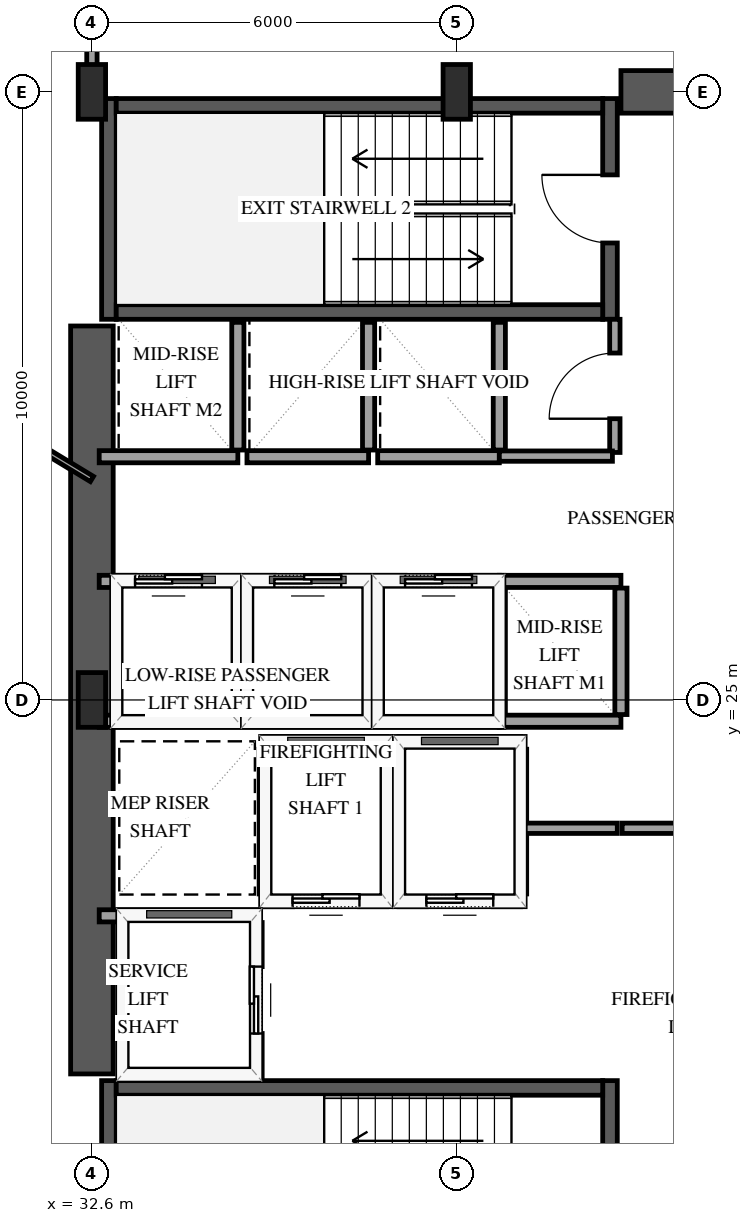
"""IFC4 building model, lengths in metres.
Left out: names, types, materials, properties, quantities, classifications, styles, units other than length and angle.
Written with IfcOpenShell. Run it as: python <this file> out.ifc"""

import sys

from ifc_helpers import new_model, si_unit, direction, frame, frame_2d, origin, origin_2d, place, context, subcontext, project, spatial, rectangle, extrude, element, fill, save


model = new_model("IFC4")
c1 = context("Model", 3, precision=1e-05, world=origin(), true_north=direction((0.0, 1.0)))
c2 = subcontext(c1, "Body", "Model", "MODEL_VIEW")
j1 = project(units=[si_unit("LENGTHUNIT", "METRE"), si_unit("PLANEANGLEUNIT", "RADIAN")], contexts=[c1])
p1 = place(None, origin())
s1 = spatial("IfcSite", under=j1, at=p1, CompositionType="ELEMENT")
p2 = place(p1, origin())
s2 = spatial("IfcBuilding", under=s1, at=p2, CompositionType="ELEMENT")
p3 = place(p2, frame((0.0, 0.0, 38.6)))
s3 = spatial("IfcBuildingStorey", under=s2, at=p3, CompositionType="ELEMENT", Elevation=38.6)
p4 = place(p3, frame((32.88, 15.11, 0.0), z_axis=(0.0, 0.0, 1.0), x_axis=(0.0, 1.0, 0.0)))
e1 = element("IfcWall", 1, at=p4, inside=s3, PredefinedType="SHEAR", context=c2, shape_type="SweptSolid", body=[
    extrude(rectangle(XDim=3.63, YDim=0.24, at=frame_2d((1.815, 0.0))), origin(), (0.0, 0.0, 1.0), 4.0),
])
p5 = place(p3, frame((41.12, 15.11, 0.0), z_axis=(0.0, 0.0, 1.0), x_axis=(0.0, 1.0, 0.0)))
e2 = element("IfcWall", 2, at=p5, inside=s3, PredefinedType="SHEAR", context=c2, shape_type="SweptSolid", body=[
    extrude(rectangle(XDim=3.63, YDim=0.24, at=frame_2d((1.815, 0.0))), origin(), (0.0, 0.0, 1.0), 4.0),
])
p6 = place(p5, frame((1.255, 0.0, 0.0)))
e3 = element("IfcOpeningElement", 3, at=p6, cuts=e2, PredefinedType="OPENING", context=c2, shape_type="SweptSolid", body=[
    extrude(rectangle(XDim=1.12, YDim=2.15, at=frame_2d((0.56, 1.075))), frame((0.0, 0.13, 0.0), z_axis=(0.0, -1.0, 0.0), x_axis=(1.0, 0.0, 0.0)), (0.0, 0.0, 1.0), 0.26),
])
p7 = place(p3, frame((33.0, 18.62, 0.0), z_axis=(0.0, 0.0, 1.0), x_axis=(1.0, 0.0, 0.0)))
e4 = element("IfcWall", 4, at=p7, inside=s3, PredefinedType="SHEAR", context=c2, shape_type="SweptSolid", body=[
    extrude(rectangle(XDim=8.0, YDim=0.24, at=frame_2d((4.0, 0.0))), origin(), (0.0, 0.0, 1.0), 4.0),
])
p8 = place(p3, frame((32.88, 31.26, 0.0), z_axis=(0.0, 0.0, 1.0), x_axis=(0.0, 1.0, 0.0)))
e5 = element("IfcWall", 5, at=p8, inside=s3, PredefinedType="SHEAR", context=c2, shape_type="SweptSolid", body=[
    extrude(rectangle(XDim=3.63, YDim=0.24, at=frame_2d((1.815, 0.0))), origin(), (0.0, 0.0, 1.0), 4.0),
])
p9 = place(p3, frame((41.12, 31.26, 0.0), z_axis=(0.0, 0.0, 1.0), x_axis=(0.0, 1.0, 0.0)))
e6 = element("IfcWall", 6, at=p9, inside=s3, PredefinedType="SHEAR", context=c2, shape_type="SweptSolid", body=[
    extrude(rectangle(XDim=3.63, YDim=0.24, at=frame_2d((1.815, 0.0))), origin(), (0.0, 0.0, 1.0), 4.0),
])
p10 = place(p9, frame((1.255, 0.0, 0.0)))
e7 = element("IfcOpeningElement", 7, at=p10, cuts=e6, PredefinedType="OPENING", context=c2, shape_type="SweptSolid", body=[
    extrude(rectangle(XDim=1.12, YDim=2.15, at=frame_2d((0.56, 1.075))), frame((0.0, 0.13, 0.0), z_axis=(0.0, -1.0, 0.0), x_axis=(1.0, 0.0, 0.0)), (0.0, 0.0, 1.0), 0.26),
])
for number, where, z_axis, x_axis in (
    (8, (33.0, 31.38, 0.0), (0.0, 0.0, 1.0), (1.0, 0.0, 0.0)),
    (9, (33.0, 34.77, 0.0), (0.0, 0.0, 1.0), (1.0, 0.0, 0.0)),
):
    element("IfcWall", number, at=place(p3, frame(where, z_axis=z_axis, x_axis=x_axis)), inside=s3, PredefinedType="SHEAR", context=c2, shape_type="SweptSolid", body=[
        extrude(rectangle(XDim=8.0, YDim=0.24, at=frame_2d((4.0, 0.0))), origin(), (0.0, 0.0, 1.0), 4.0),
    ])
p11 = place(p3, frame((32.6, 18.85, 0.0), z_axis=(0.0, 0.0, 1.0), x_axis=(0.0, 1.0, 0.0)))
e10 = element("IfcWall", 10, at=p11, inside=s3, PredefinedType="SHEAR", context=c2, shape_type="SweptSolid", body=[
    extrude(rectangle(XDim=12.3, YDim=0.7, at=frame_2d((6.15, 0.0))), origin(), (0.0, 0.0, 1.0), 4.0),
])
p12 = place(p3, frame((41.3, 35.0, 0.0), z_axis=(0.0, 0.0, 1.0), x_axis=(1.0, 0.0, 0.0)))
e11 = element("IfcWall", 11, at=p12, inside=s3, PredefinedType="SHEAR", context=c2, shape_type="SweptSolid", body=[
    extrude(rectangle(XDim=2.85, YDim=0.7, at=frame_2d((1.425, 0.0))), origin(), (0.0, 0.0, 1.0), 4.0),
])
for number, where, z_axis, x_axis in (
    (12, (32.6, 25.0, 0.0), (0.0, 0.0, 1.0), (1.0, 0.0, 0.0)),
    (13, (32.6, 35.0, 0.0), (0.0, 0.0, 1.0), (1.0, 0.0, 0.0)),
    (14, (38.6, 35.0, 0.0), (0.0, 0.0, 1.0), (1.0, 0.0, 0.0)),
):
    element("IfcColumn", number, at=place(p3, frame(where, z_axis=z_axis, x_axis=x_axis)), inside=s3, PredefinedType="PILASTER", context=c2, shape_type="SweptSolid", body=[
        extrude(rectangle(XDim=0.45, YDim=0.9, at=origin_2d()), origin(), (0.0, 0.0, 1.0), 4.0),
    ])
p13 = place(p3, frame((35.45, 21.7, 0.0), z_axis=(0.0, 0.0, 1.0), x_axis=(1.0, 0.0, 0.0)))
e15 = element("IfcWall", 15, at=p13, inside=s3, PredefinedType="SOLIDWALL", context=c2, shape_type="SweptSolid", body=[
    extrude(rectangle(XDim=2.0, YDim=0.2, at=frame_2d((1.0, 0.0))), origin(), (0.0, 0.0, 1.0), 3.7),
])
p14 = place(p13, frame((0.45, 0.0, 0.0)))
e16 = element("IfcOpeningElement", 16, at=p14, cuts=e15, PredefinedType="OPENING", context=c2, shape_type="SweptSolid", body=[
    extrude(rectangle(XDim=1.1, YDim=2.15, at=frame_2d((0.55, 1.075))), frame((0.0, 0.11, 0.0), z_axis=(0.0, -1.0, 0.0), x_axis=(1.0, 0.0, 0.0)), (0.0, 0.0, 1.0), 0.22),
])
p15 = place(p3, frame((35.45, 24.3, 0.0), z_axis=(0.0, 0.0, 1.0), x_axis=(1.0, 0.0, 0.0)))
e17 = element("IfcWall", 17, at=p15, inside=s3, PredefinedType="SOLIDWALL", context=c2, shape_type="SweptSolid", body=[
    extrude(rectangle(XDim=2.0, YDim=0.2, at=frame_2d((1.0, 0.0))), origin(), (0.0, 0.0, 1.0), 3.7),
])
for number, where, z_axis, x_axis in (
    (18, (35.45, 21.81, 0.0), (0.0, 0.0, 1.0), (0.0, 1.0, 0.0)),
    (19, (37.45, 21.81, 0.0), (0.0, 0.0, 1.0), (0.0, 1.0, 0.0)),
):
    element("IfcWall", number, at=place(p3, frame(where, z_axis=z_axis, x_axis=x_axis)), inside=s3, PredefinedType="SOLIDWALL", context=c2, shape_type="SweptSolid", body=[
        extrude(rectangle(XDim=2.38, YDim=0.2, at=frame_2d((1.19, 0.0))), origin(), (0.0, 0.0, 1.0), 3.7),
    ])
p16 = place(p3, frame((37.65, 21.7, 0.0), z_axis=(0.0, 0.0, 1.0), x_axis=(1.0, 0.0, 0.0)))
e20 = element("IfcWall", 20, at=p16, inside=s3, PredefinedType="SOLIDWALL", context=c2, shape_type="SweptSolid", body=[
    extrude(rectangle(XDim=2.0, YDim=0.2, at=frame_2d((1.0, 0.0))), origin(), (0.0, 0.0, 1.0), 3.7),
])
p17 = place(p16, frame((0.45, 0.0, 0.0)))
e21 = element("IfcOpeningElement", 21, at=p17, cuts=e20, PredefinedType="OPENING", context=c2, shape_type="SweptSolid", body=[
    extrude(rectangle(XDim=1.1, YDim=2.15, at=frame_2d((0.55, 1.075))), frame((0.0, 0.11, 0.0), z_axis=(0.0, -1.0, 0.0), x_axis=(1.0, 0.0, 0.0)), (0.0, 0.0, 1.0), 0.22),
])
p18 = place(p3, frame((37.65, 24.3, 0.0), z_axis=(0.0, 0.0, 1.0), x_axis=(1.0, 0.0, 0.0)))
e22 = element("IfcWall", 22, at=p18, inside=s3, PredefinedType="SOLIDWALL", context=c2, shape_type="SweptSolid", body=[
    extrude(rectangle(XDim=2.0, YDim=0.2, at=frame_2d((1.0, 0.0))), origin(), (0.0, 0.0, 1.0), 3.7),
])
p19 = place(p3, frame((39.65, 21.81, 0.0), z_axis=(0.0, 0.0, 1.0), x_axis=(0.0, 1.0, 0.0)))
e23 = element("IfcWall", 23, at=p19, inside=s3, PredefinedType="SOLIDWALL", context=c2, shape_type="SweptSolid", body=[
    extrude(rectangle(XDim=2.38, YDim=0.2, at=frame_2d((1.19, 0.0))), origin(), (0.0, 0.0, 1.0), 3.7),
])
p20 = place(p3, frame((32.72, 21.45, 0.0), z_axis=(0.0, 0.0, 1.0), x_axis=(1.0, 0.0, 0.0)))
e24 = element("IfcWall", 24, at=p20, inside=s3, PredefinedType="SOLIDWALL", context=c2, shape_type="SweptSolid", body=[
    extrude(rectangle(XDim=2.58, YDim=0.2, at=frame_2d((1.29, 0.0))), origin(), (0.0, 0.0, 1.0), 3.7),
])
p21 = place(p3, frame((35.3, 18.79, 0.0), z_axis=(0.0, 0.0, 1.0), x_axis=(0.0, 1.0, 0.0)))
e25 = element("IfcWall", 25, at=p21, inside=s3, PredefinedType="SOLIDWALL", context=c2, shape_type="SweptSolid", body=[
    extrude(rectangle(XDim=2.55, YDim=0.2, at=frame_2d((1.275, 0.0))), origin(), (0.0, 0.0, 1.0), 3.7),
])
p22 = place(p21, frame((0.725, 0.0, 0.0)))
e26 = element("IfcOpeningElement", 26, at=p22, cuts=e25, PredefinedType="OPENING", context=c2, shape_type="SweptSolid", body=[
    extrude(rectangle(XDim=1.1, YDim=2.15, at=frame_2d((0.55, 1.075))), frame((0.0, 0.11, 0.0), z_axis=(0.0, -1.0, 0.0), x_axis=(1.0, 0.0, 0.0)), (0.0, 0.0, 1.0), 0.22),
])
p23 = place(p3, frame((32.72, 24.65, 0.0), z_axis=(0.0, 0.0, 1.0), x_axis=(1.0, 0.0, 0.0)))
e27 = element("IfcWall", 27, at=p23, inside=s3, PredefinedType="SOLIDWALL", context=c2, shape_type="SweptSolid", body=[
    extrude(rectangle(XDim=2.28, YDim=0.2, at=frame_2d((1.14, 0.0))), origin(), (0.0, 0.0, 1.0), 3.7),
])
p24 = place(p3, frame((32.72, 26.95, 0.0), z_axis=(0.0, 0.0, 1.0), x_axis=(1.0, 0.0, 0.0)))
e28 = element("IfcWall", 28, at=p24, inside=s3, PredefinedType="SOLIDWALL", context=c2, shape_type="SweptSolid", body=[
    extrude(rectangle(XDim=2.28, YDim=0.2, at=frame_2d((1.14, 0.0))), origin(), (0.0, 0.0, 1.0), 3.7),
])
p25 = place(p24, frame((0.59, 0.0, 0.0)))
e29 = element("IfcOpeningElement", 29, at=p25, cuts=e28, PredefinedType="OPENING", context=c2, shape_type="SweptSolid", body=[
    extrude(rectangle(XDim=1.1, YDim=2.15, at=frame_2d((0.55, 1.075))), frame((0.0, 0.11, 0.0), z_axis=(0.0, -1.0, 0.0), x_axis=(1.0, 0.0, 0.0)), (0.0, 0.0, 1.0), 0.22),
])
p26 = place(p3, frame((35.0, 24.76, 0.0), z_axis=(0.0, 0.0, 1.0), x_axis=(0.0, 1.0, 0.0)))
e30 = element("IfcWall", 30, at=p26, inside=s3, PredefinedType="SOLIDWALL", context=c2, shape_type="SweptSolid", body=[
    extrude(rectangle(XDim=2.08, YDim=0.2, at=frame_2d((1.04, 0.0))), origin(), (0.0, 0.0, 1.0), 3.7),
])
p27 = place(p3, frame((35.15, 24.65, 0.0), z_axis=(0.0, 0.0, 1.0), x_axis=(1.0, 0.0, 0.0)))
e31 = element("IfcWall", 31, at=p27, inside=s3, PredefinedType="SOLIDWALL", context=c2, shape_type="SweptSolid", body=[
    extrude(rectangle(XDim=2.0, YDim=0.2, at=frame_2d((1.0, 0.0))), origin(), (0.0, 0.0, 1.0), 3.7),
])
p28 = place(p3, frame((35.15, 26.95, 0.0), z_axis=(0.0, 0.0, 1.0), x_axis=(1.0, 0.0, 0.0)))
e32 = element("IfcWall", 32, at=p28, inside=s3, PredefinedType="SOLIDWALL", context=c2, shape_type="SweptSolid", body=[
    extrude(rectangle(XDim=2.0, YDim=0.2, at=frame_2d((1.0, 0.0))), origin(), (0.0, 0.0, 1.0), 3.7),
])
p29 = place(p28, frame((0.45, 0.0, 0.0)))
e33 = element("IfcOpeningElement", 33, at=p29, cuts=e32, PredefinedType="OPENING", context=c2, shape_type="SweptSolid", body=[
    extrude(rectangle(XDim=1.1, YDim=2.15, at=frame_2d((0.55, 1.075))), frame((0.0, 0.11, 0.0), z_axis=(0.0, -1.0, 0.0), x_axis=(1.0, 0.0, 0.0)), (0.0, 0.0, 1.0), 0.22),
])
p30 = place(p3, frame((37.15, 24.76, 0.0), z_axis=(0.0, 0.0, 1.0), x_axis=(0.0, 1.0, 0.0)))
e34 = element("IfcWall", 34, at=p30, inside=s3, PredefinedType="SOLIDWALL", context=c2, shape_type="SweptSolid", body=[
    extrude(rectangle(XDim=2.08, YDim=0.2, at=frame_2d((1.04, 0.0))), origin(), (0.0, 0.0, 1.0), 3.7),
])
p31 = place(p3, frame((37.3, 24.65, 0.0), z_axis=(0.0, 0.0, 1.0), x_axis=(1.0, 0.0, 0.0)))
e35 = element("IfcWall", 35, at=p31, inside=s3, PredefinedType="SOLIDWALL", context=c2, shape_type="SweptSolid", body=[
    extrude(rectangle(XDim=2.0, YDim=0.2, at=frame_2d((1.0, 0.0))), origin(), (0.0, 0.0, 1.0), 3.7),
])
p32 = place(p3, frame((37.3, 26.95, 0.0), z_axis=(0.0, 0.0, 1.0), x_axis=(1.0, 0.0, 0.0)))
e36 = element("IfcWall", 36, at=p32, inside=s3, PredefinedType="SOLIDWALL", context=c2, shape_type="SweptSolid", body=[
    extrude(rectangle(XDim=2.0, YDim=0.2, at=frame_2d((1.0, 0.0))), origin(), (0.0, 0.0, 1.0), 3.7),
])
p33 = place(p32, frame((0.45, 0.0, 0.0)))
e37 = element("IfcOpeningElement", 37, at=p33, cuts=e36, PredefinedType="OPENING", context=c2, shape_type="SweptSolid", body=[
    extrude(rectangle(XDim=1.1, YDim=2.15, at=frame_2d((0.55, 1.075))), frame((0.0, 0.11, 0.0), z_axis=(0.0, -1.0, 0.0), x_axis=(1.0, 0.0, 0.0)), (0.0, 0.0, 1.0), 0.22),
])
p34 = place(p3, frame((39.3, 24.76, 0.0), z_axis=(0.0, 0.0, 1.0), x_axis=(0.0, 1.0, 0.0)))
e38 = element("IfcWall", 38, at=p34, inside=s3, PredefinedType="SOLIDWALL", context=c2, shape_type="SweptSolid", body=[
    extrude(rectangle(XDim=2.08, YDim=0.2, at=frame_2d((1.04, 0.0))), origin(), (0.0, 0.0, 1.0), 3.7),
])
for number, where, z_axis, x_axis in (
    (39, (39.3, 24.65, 0.0), (0.0, 0.0, 1.0), (1.0, 0.0, 0.0)),
    (40, (39.3, 26.95, 0.0), (0.0, 0.0, 1.0), (1.0, 0.0, 0.0)),
):
    element("IfcWall", number, at=place(p3, frame(where, z_axis=z_axis, x_axis=x_axis)), inside=s3, PredefinedType="SOLIDWALL", context=c2, shape_type="SweptSolid", body=[
        extrude(rectangle(XDim=2.0, YDim=0.2, at=frame_2d((1.0, 0.0))), origin(), (0.0, 0.0, 1.0), 3.7),
    ])
p35 = place(p3, frame((41.3, 24.76, 0.0), z_axis=(0.0, 0.0, 1.0), x_axis=(0.0, 1.0, 0.0)))
e41 = element("IfcWall", 41, at=p35, inside=s3, PredefinedType="SOLIDWALL", context=c2, shape_type="SweptSolid", body=[
    extrude(rectangle(XDim=2.08, YDim=0.2, at=frame_2d((1.04, 0.0))), origin(), (0.0, 0.0, 1.0), 3.7),
])
p36 = place(p3, frame((32.72, 29.0, 0.0), z_axis=(0.0, 0.0, 1.0), x_axis=(1.0, 0.0, 0.0)))
e42 = element("IfcWall", 42, at=p36, inside=s3, PredefinedType="SOLIDWALL", context=c2, shape_type="SweptSolid", body=[
    extrude(rectangle(XDim=2.28, YDim=0.2, at=frame_2d((1.14, 0.0))), origin(), (0.0, 0.0, 1.0), 3.7),
])
p37 = place(p3, frame((35.0, 29.11, 0.0), z_axis=(0.0, 0.0, 1.0), x_axis=(0.0, 1.0, 0.0)))
e43 = element("IfcWall", 43, at=p37, inside=s3, PredefinedType="SOLIDWALL", context=c2, shape_type="SweptSolid", body=[
    extrude(rectangle(XDim=2.1, YDim=0.2, at=frame_2d((1.05, 0.0))), origin(), (0.0, 0.0, 1.0), 3.7),
])
p38 = place(p3, frame((35.15, 29.0, 0.0), z_axis=(0.0, 0.0, 1.0), x_axis=(1.0, 0.0, 0.0)))
e44 = element("IfcWall", 44, at=p38, inside=s3, PredefinedType="SOLIDWALL", context=c2, shape_type="SweptSolid", body=[
    extrude(rectangle(XDim=2.0, YDim=0.2, at=frame_2d((1.0, 0.0))), origin(), (0.0, 0.0, 1.0), 3.7),
])
p39 = place(p3, frame((37.15, 29.11, 0.0), z_axis=(0.0, 0.0, 1.0), x_axis=(0.0, 1.0, 0.0)))
e45 = element("IfcWall", 45, at=p39, inside=s3, PredefinedType="SOLIDWALL", context=c2, shape_type="SweptSolid", body=[
    extrude(rectangle(XDim=2.1, YDim=0.2, at=frame_2d((1.05, 0.0))), origin(), (0.0, 0.0, 1.0), 3.7),
])
p40 = place(p3, frame((37.3, 29.0, 0.0), z_axis=(0.0, 0.0, 1.0), x_axis=(1.0, 0.0, 0.0)))
e46 = element("IfcWall", 46, at=p40, inside=s3, PredefinedType="SOLIDWALL", context=c2, shape_type="SweptSolid", body=[
    extrude(rectangle(XDim=2.0, YDim=0.2, at=frame_2d((1.0, 0.0))), origin(), (0.0, 0.0, 1.0), 3.7),
])
p41 = place(p3, frame((39.3, 29.11, 0.0), z_axis=(0.0, 0.0, 1.0), x_axis=(0.0, 1.0, 0.0)))
e47 = element("IfcWall", 47, at=p41, inside=s3, PredefinedType="SOLIDWALL", context=c2, shape_type="SweptSolid", body=[
    extrude(rectangle(XDim=2.1, YDim=0.2, at=frame_2d((1.05, 0.0))), origin(), (0.0, 0.0, 1.0), 3.7),
])
p42 = place(p3, frame((32.6, 28.634, 0.0), z_axis=(0.0, 0.0, 1.0), x_axis=(-0.855385077894, 0.517992633651, 0.0)))
e48 = element("IfcWall", 48, at=p42, inside=s3, PredefinedType="PARTITIONING", context=c2, shape_type="SweptSolid", body=[
    extrude(rectangle(XDim=7.896, YDim=0.1, at=frame_2d((3.948, 0.0))), origin(), (0.0, 0.0, 1.0), 3.7),
])
p43 = place(p3, frame((41.32, 22.89, 0.0), z_axis=(0.0, 0.0, 1.0), x_axis=(1.0, 0.0, 0.0)))
e49 = element("IfcWall", 49, at=p43, inside=s3, PredefinedType="PARTITIONING", context=c2, shape_type="SweptSolid", body=[
    extrude(rectangle(XDim=3.24, YDim=0.17, at=frame_2d((1.62, 0.0))), origin(), (0.0, 0.0, 1.0), 3.7),
])
p44 = place(p43, frame((1.08, 0.0, 0.0)))
e50 = element("IfcOpeningElement", 50, at=p44, cuts=e49, PredefinedType="OPENING", context=c2, shape_type="SweptSolid", body=[
    extrude(rectangle(XDim=1.08, YDim=2.15, at=frame_2d((0.54, 1.075))), frame((0.0, 0.095, 0.0), z_axis=(0.0, -1.0, 0.0), x_axis=(1.0, 0.0, 0.0)), (0.0, 0.0, 1.0), 0.19),
])
p45 = place(p3, frame((41.2, 29.07, 0.0), z_axis=(0.0, 0.0, 1.0), x_axis=(0.0, 1.0, 0.0)))
e51 = element("IfcWall", 51, at=p45, inside=s3, PredefinedType="PARTITIONING", context=c2, shape_type="SweptSolid", body=[
    extrude(rectangle(XDim=2.19, YDim=0.17, at=frame_2d((1.095, 0.0))), origin(), (0.0, 0.0, 1.0), 3.7),
])
p46 = place(p45, frame((0.555, 0.0, 0.0)))
e52 = element("IfcOpeningElement", 52, at=p46, cuts=e51, PredefinedType="OPENING", context=c2, shape_type="SweptSolid", body=[
    extrude(rectangle(XDim=1.08, YDim=2.15, at=frame_2d((0.54, 1.075))), frame((0.0, 0.095, 0.0), z_axis=(0.0, -1.0, 0.0), x_axis=(1.0, 0.0, 0.0)), (0.0, 0.0, 1.0), 0.19),
])
p47 = place(p3, frame((32.6, 35.07, 0.0), z_axis=(0.0, 0.0, 1.0), x_axis=(0.0, 1.0, 0.0)))
e53 = element("IfcWall", 53, at=p47, inside=s3, PredefinedType="PARTITIONING", context=c2, shape_type="SweptSolid", body=[
    extrude(rectangle(XDim=1.91, YDim=0.17, at=frame_2d((0.955, 0.0))), origin(), (0.0, 0.0, 1.0), 3.7),
])
p48 = place(p3, frame((39.3, 29.01, 0.0), z_axis=(0.0, 0.0, 1.0), x_axis=(1.0, 0.0, 0.0)))
e54 = element("IfcWall", 54, at=p48, inside=s3, PredefinedType="PARTITIONING", context=c2, shape_type="SweptSolid", body=[
    extrude(rectangle(XDim=1.86, YDim=0.17, at=frame_2d((0.93, 0.0))), origin(), (0.0, 0.0, 1.0), 3.7),
])
p49 = place(p3, frame((39.72, 22.89, 0.0), z_axis=(0.0, 0.0, 1.0), x_axis=(1.0, 0.0, 0.0)))
e55 = element("IfcWall", 55, at=p49, inside=s3, PredefinedType="PARTITIONING", context=c2, shape_type="SweptSolid", body=[
    extrude(rectangle(XDim=1.52, YDim=0.17, at=frame_2d((0.76, 0.0))), origin(), (0.0, 0.0, 1.0), 3.7),
])
p50 = place(p14, origin())
e56 = element("IfcDoor", 56, at=p50, inside=s3, OperationType="SLIDING_TO_LEFT", PredefinedType="DOOR", context=c2, shape_type="SweptSolid", body=[
    extrude(rectangle(XDim=1.1, YDim=2.15, at=frame_2d((0.55, 1.075))), frame((0.0, 0.025, 0.0), z_axis=(0.0, -1.0, 0.0), x_axis=(1.0, 0.0, 0.0)), (0.0, 0.0, 1.0), 0.05),
])
fill(e16, e56)
p51 = place(p17, origin())
e57 = element("IfcDoor", 57, at=p51, inside=s3, OperationType="SLIDING_TO_LEFT", PredefinedType="DOOR", context=c2, shape_type="SweptSolid", body=[
    extrude(rectangle(XDim=1.1, YDim=2.15, at=frame_2d((0.55, 1.075))), frame((0.0, 0.025, 0.0), z_axis=(0.0, -1.0, 0.0), x_axis=(1.0, 0.0, 0.0)), (0.0, 0.0, 1.0), 0.05),
])
fill(e21, e57)
p52 = place(p22, origin())
e58 = element("IfcDoor", 58, at=p52, inside=s3, OperationType="SLIDING_TO_LEFT", PredefinedType="DOOR", context=c2, shape_type="SweptSolid", body=[
    extrude(rectangle(XDim=1.1, YDim=2.15, at=frame_2d((0.55, 1.075))), frame((0.0, 0.025, 0.0), z_axis=(0.0, -1.0, 0.0), x_axis=(1.0, 0.0, 0.0)), (0.0, 0.0, 1.0), 0.05),
])
fill(e26, e58)
p53 = place(p25, origin())
e59 = element("IfcDoor", 59, at=p53, inside=s3, OperationType="SLIDING_TO_LEFT", PredefinedType="DOOR", context=c2, shape_type="SweptSolid", body=[
    extrude(rectangle(XDim=1.1, YDim=2.15, at=frame_2d((0.55, 1.075))), frame((0.0, 0.025, 0.0), z_axis=(0.0, -1.0, 0.0), x_axis=(1.0, 0.0, 0.0)), (0.0, 0.0, 1.0), 0.05),
])
fill(e29, e59)
p54 = place(p29, origin())
e60 = element("IfcDoor", 60, at=p54, inside=s3, OperationType="SLIDING_TO_LEFT", PredefinedType="DOOR", context=c2, shape_type="SweptSolid", body=[
    extrude(rectangle(XDim=1.1, YDim=2.15, at=frame_2d((0.55, 1.075))), frame((0.0, 0.025, 0.0), z_axis=(0.0, -1.0, 0.0), x_axis=(1.0, 0.0, 0.0)), (0.0, 0.0, 1.0), 0.05),
])
fill(e33, e60)
p55 = place(p33, origin())
e61 = element("IfcDoor", 61, at=p55, inside=s3, OperationType="SLIDING_TO_LEFT", PredefinedType="DOOR", context=c2, shape_type="SweptSolid", body=[
    extrude(rectangle(XDim=1.1, YDim=2.15, at=frame_2d((0.55, 1.075))), frame((0.0, 0.025, 0.0), z_axis=(0.0, -1.0, 0.0), x_axis=(1.0, 0.0, 0.0)), (0.0, 0.0, 1.0), 0.05),
])
fill(e37, e61)
p56 = place(p10, origin())
e62 = element("IfcDoor", 62, at=p56, inside=s3, OperationType="SINGLE_SWING_RIGHT", PredefinedType="DOOR", context=c2, shape_type="SweptSolid", body=[
    extrude(rectangle(XDim=1.12, YDim=2.15, at=frame_2d((0.56, 1.075))), frame((0.0, 0.025, 0.0), z_axis=(0.0, -1.0, 0.0), x_axis=(1.0, 0.0, 0.0)), (0.0, 0.0, 1.0), 0.05),
])
fill(e7, e62)
p57 = place(p46, origin())
e63 = element("IfcDoor", 63, at=p57, inside=s3, OperationType="SINGLE_SWING_LEFT", PredefinedType="DOOR", context=c2, shape_type="SweptSolid", body=[
    extrude(rectangle(XDim=1.08, YDim=2.15, at=frame_2d((0.54, 1.075))), frame((0.0, 0.025, 0.0), z_axis=(0.0, -1.0, 0.0), x_axis=(1.0, 0.0, 0.0)), (0.0, 0.0, 1.0), 0.05),
])
fill(e52, e63)
save(model, sys.argv[1])
